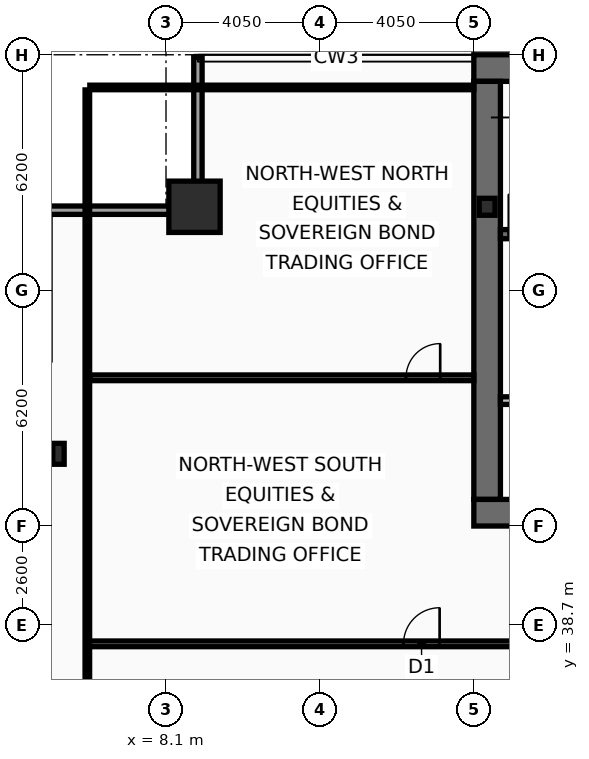
"""IFC4 building model, lengths in metres.
Left out: names, types, materials, properties, quantities, classifications, styles, units other than length and angle.
Written with IfcOpenShell. Run it as: python <this file> out.ifc"""

import sys

from ifc_helpers import new_model, si_unit, direction, frame, frame_2d, origin, origin_2d, place, context, subcontext, project, spatial, rectangle, hollow_rectangle, i_section, extrude, element, fill, save


model = new_model("IFC4")
c1 = context("Model", 3, precision=1e-05, world=origin(), true_north=direction((0.0, 1.0)))
c2 = subcontext(c1, "Body", "Model", "MODEL_VIEW")
j1 = project(units=[si_unit("LENGTHUNIT", "METRE"), si_unit("PLANEANGLEUNIT", "RADIAN")], contexts=[c1])
p1 = place(None, origin())
s1 = spatial("IfcSite", under=j1, at=p1, CompositionType="ELEMENT")
p2 = place(p1, origin())
s2 = spatial("IfcBuilding", under=s1, at=p2, CompositionType="ELEMENT")
p3 = place(p2, frame((0.0, 0.0, 157.8)))
s3 = spatial("IfcBuildingStorey", under=s2, at=p3, CompositionType="ELEMENT", Elevation=157.8)
p4 = place(p3, frame((16.2, 53.35, 0.0), z_axis=(0.0, 0.0, 1.0), x_axis=(1.0, 0.0, 0.0)))
e1 = element("IfcWall", 1, at=p4, inside=s3, PredefinedType="SHEAR", context=c2, shape_type="SweptSolid", body=[
    extrude(rectangle(XDim=40.5, YDim=0.7, at=frame_2d((20.25, 0.0))), origin(), (0.0, 0.0, 1.0), 3.44),
])
p5 = place(p3, frame((16.55, 42.0, 0.0), z_axis=(0.0, 0.0, 1.0), x_axis=(0.0, 1.0, 0.0)))
e2 = element("IfcWall", 2, at=p5, inside=s3, PredefinedType="SHEAR", context=c2, shape_type="SweptSolid", body=[
    extrude(rectangle(XDim=11.0, YDim=0.7, at=frame_2d((5.5, 0.0))), origin(), (0.0, 0.0, 1.0), 3.44),
])
p6 = place(p3, frame((18.65, 41.65, 0.0), z_axis=(0.0, 0.0, 1.0), x_axis=(-1.0, 0.0, 0.0)))
e3 = element("IfcWall", 3, at=p6, inside=s3, PredefinedType="SHEAR", context=c2, shape_type="SweptSolid", body=[
    extrude(rectangle(XDim=2.45, YDim=0.7, at=frame_2d((1.225, 0.0))), origin(), (0.0, 0.0, 1.0), 3.44),
])
p7 = place(p3, frame((16.9, 48.98, 0.0), z_axis=(0.0, 0.0, 1.0), x_axis=(1.0, 0.0, 0.0)))
e4 = element("IfcWall", 4, at=p7, inside=s3, PredefinedType="SHEAR", context=c2, shape_type="SweptSolid", body=[
    extrude(rectangle(XDim=7.32, YDim=0.24, at=frame_2d((3.66, 0.0))), origin(), (0.0, 0.0, 1.0), 3.44),
])
p8 = place(p7, frame((0.22, 0.0, 0.0)))
e5 = element("IfcOpeningElement", 5, at=p8, cuts=e4, PredefinedType="OPENING", context=c2, shape_type="SweptSolid", body=[
    extrude(rectangle(XDim=1.05, YDim=2.15, at=frame_2d((0.525, 1.075))), frame((0.0, 0.13, 0.0), z_axis=(0.0, -1.0, 0.0), x_axis=(1.0, 0.0, 0.0)), (0.0, 0.0, 1.0), 0.26),
])
p9 = place(p3, frame((8.85, 49.7, 0.0), z_axis=(0.0, 0.0, 1.0), x_axis=(1.0, 0.0, 0.0)))
e6 = element("IfcColumn", 6, at=p9, inside=s3, PredefinedType="COLUMN", context=c2, shape_type="SweptSolid", body=[
    extrude(hollow_rectangle(XDim=1.35, YDim=1.35, WallThickness=0.065, at=origin_2d()), origin(), (0.0, 0.0, 1.0), 3.6),
])
p10 = place(p3, frame((5.27, 43.2, 0.0), z_axis=(0.0, 0.0, 1.0), x_axis=(1.0, 0.0, 0.0)))
e7 = element("IfcColumn", 7, at=p10, inside=s3, PredefinedType="COLUMN", context=c2, shape_type="SweptSolid", body=[
    extrude(i_section(OverallWidth=0.3, OverallDepth=0.55, WebThickness=0.015, FlangeThickness=0.029, at=origin_2d()), origin(), (0.0, 0.0, 1.0), 3.6),
])
p11 = place(p3, frame((16.55, 49.7, 0.0), z_axis=(0.0, 0.0, 1.0), x_axis=(1.0, 0.0, 0.0)))
e8 = element("IfcColumn", 8, at=p11, inside=s3, PredefinedType="COLUMN", context=c2, shape_type="SweptSolid", body=[
    extrude(i_section(OverallWidth=0.416, OverallDepth=0.446, WebThickness=0.039, FlangeThickness=0.063, at=origin_2d()), origin(), (0.0, 0.0, 1.0), 3.6),
])
p12 = place(p3, frame((4.83, 49.61, 0.0), z_axis=(0.0, 0.0, 1.0), x_axis=(1.0, 0.0, 0.0)))
e9 = element("IfcWall", 9, at=p12, inside=s3, PredefinedType="SOLIDWALL", context=c2, shape_type="SweptSolid", body=[
    extrude(rectangle(XDim=4.22, YDim=0.22, at=frame_2d((2.11, 0.0))), origin(), (0.0, 0.0, 1.0), 2.83),
])
p13 = place(p3, frame((8.94, 49.72, 0.0), z_axis=(0.0, 0.0, 1.0), x_axis=(0.0, 1.0, 0.0)))
e10 = element("IfcWall", 10, at=p13, inside=s3, PredefinedType="SOLIDWALL", context=c2, shape_type="SweptSolid", body=[
    extrude(rectangle(XDim=3.91, YDim=0.22, at=frame_2d((1.955, 0.0))), origin(), (0.0, 0.0, 1.0), 2.83),
])
p14 = place(p3, frame((16.9, 44.6, 0.0), z_axis=(0.0, 0.0, 1.0), x_axis=(1.0, 0.0, 0.0)))
e11 = element("IfcWall", 11, at=p14, inside=s3, PredefinedType="PARTITIONING", context=c2, shape_type="SweptSolid", body=[
    extrude(rectangle(XDim=4.1, YDim=0.2, at=frame_2d((2.05, 0.0))), origin(), (0.0, 0.0, 1.0), 3.44),
])
p15 = place(p14, frame((1.25, 0.0, 0.0)))
e12 = element("IfcOpeningElement", 12, at=p15, cuts=e11, PredefinedType="OPENING", context=c2, shape_type="SweptSolid", body=[
    extrude(rectangle(XDim=1.05, YDim=2.15, at=frame_2d((0.525, 1.075))), frame((0.0, 0.11, 0.0), z_axis=(0.0, -1.0, 0.0), x_axis=(1.0, 0.0, 0.0)), (0.0, 0.0, 1.0), 0.22),
])
p16 = place(p3, frame((6.03, 38.2, 0.0), z_axis=(0.0, 0.0, 1.0), x_axis=(1.0, 0.0, 0.0)))
e13 = element("IfcWall", 13, at=p16, inside=s3, PredefinedType="PARTITIONING", context=c2, shape_type="SweptSolid", body=[
    extrude(rectangle(XDim=12.52, YDim=0.15, at=frame_2d((6.26, 0.0))), origin(), (0.0, 0.0, 1.0), 2.73),
])
p17 = place(p16, frame((8.32, 0.0, 0.0)))
e14 = element("IfcOpeningElement", 14, at=p17, cuts=e13, PredefinedType="OPENING", context=c2, shape_type="SweptSolid", body=[
    extrude(rectangle(XDim=0.95, YDim=2.05, at=frame_2d((0.475, 1.025))), frame((0.0, 0.085, 0.0), z_axis=(0.0, -1.0, 0.0), x_axis=(1.0, 0.0, 0.0)), (0.0, 0.0, 1.0), 0.17),
])
p18 = place(p3, frame((6.095, 45.2, 0.0), z_axis=(0.0, 0.0, 1.0), x_axis=(1.0, 0.0, 0.0)))
e15 = element("IfcWall", 15, at=p18, inside=s3, PredefinedType="PARTITIONING", context=c2, shape_type="SweptSolid", body=[
    extrude(rectangle(XDim=10.105, YDim=0.15, at=frame_2d((5.052, 0.0))), origin(), (0.0, 0.0, 1.0), 2.83),
])
p19 = place(p18, frame((8.32, 0.0, 0.0)))
e16 = element("IfcOpeningElement", 16, at=p19, cuts=e15, PredefinedType="OPENING", context=c2, shape_type="SweptSolid", body=[
    extrude(rectangle(XDim=0.9, YDim=2.05, at=frame_2d((0.45, 1.025))), frame((0.0, 0.085, 0.0), z_axis=(0.0, -1.0, 0.0), x_axis=(1.0, 0.0, 0.0)), (0.0, 0.0, 1.0), 0.17),
])
p20 = place(p3, frame((6.03, 10.665, 0.0), z_axis=(0.0, 0.0, 1.0), x_axis=(0.0, 1.0, 0.0)))
e17 = element("IfcWall", 17, at=p20, inside=s3, PredefinedType="PARTITIONING", context=c2, shape_type="SweptSolid", body=[
    extrude(rectangle(XDim=42.11, YDim=0.12, at=frame_2d((21.055, 0.0))), origin(), (0.0, 0.0, 1.0), 2.73),
])
p21 = place(p3, frame((6.095, 52.84, 0.0), z_axis=(0.0, 0.0, 1.0), x_axis=(1.0, 0.0, 0.0)))
e18 = element("IfcWall", 18, at=p21, inside=s3, PredefinedType="PARTITIONING", context=c2, shape_type="SweptSolid", body=[
    extrude(rectangle(XDim=10.105, YDim=0.12, at=frame_2d((5.052, 0.0))), origin(), (0.0, 0.0, 1.0), 3.44),
])
p22 = place(p8, origin())
e19 = element("IfcDoor", 19, at=p22, inside=s3, OperationType="SINGLE_SWING_LEFT", PredefinedType="DOOR", context=c2, shape_type="SweptSolid", body=[
    extrude(rectangle(XDim=1.05, YDim=2.15, at=frame_2d((0.525, 1.075))), frame((0.0, 0.025, 0.0), z_axis=(0.0, -1.0, 0.0), x_axis=(1.0, 0.0, 0.0)), (0.0, 0.0, 1.0), 0.05),
])
fill(e5, e19)
p23 = place(p17, origin())
e20 = element("IfcDoor", 20, at=p23, inside=s3, OperationType="SINGLE_SWING_RIGHT", PredefinedType="DOOR", context=c2, shape_type="SweptSolid", body=[
    extrude(rectangle(XDim=0.95, YDim=2.05, at=frame_2d((0.475, 1.025))), frame((0.0, 0.025, 0.0), z_axis=(0.0, -1.0, 0.0), x_axis=(1.0, 0.0, 0.0)), (0.0, 0.0, 1.0), 0.05),
])
fill(e14, e20)
p24 = place(p19, origin())
e21 = element("IfcDoor", 21, at=p24, inside=s3, OperationType="SINGLE_SWING_RIGHT", PredefinedType="DOOR", context=c2, shape_type="SweptSolid", body=[
    extrude(rectangle(XDim=0.9, YDim=2.05, at=frame_2d((0.45, 1.025))), frame((0.0, 0.025, 0.0), z_axis=(0.0, -1.0, 0.0), x_axis=(1.0, 0.0, 0.0)), (0.0, 0.0, 1.0), 0.05),
])
fill(e16, e21)
save(model, sys.argv[1])
